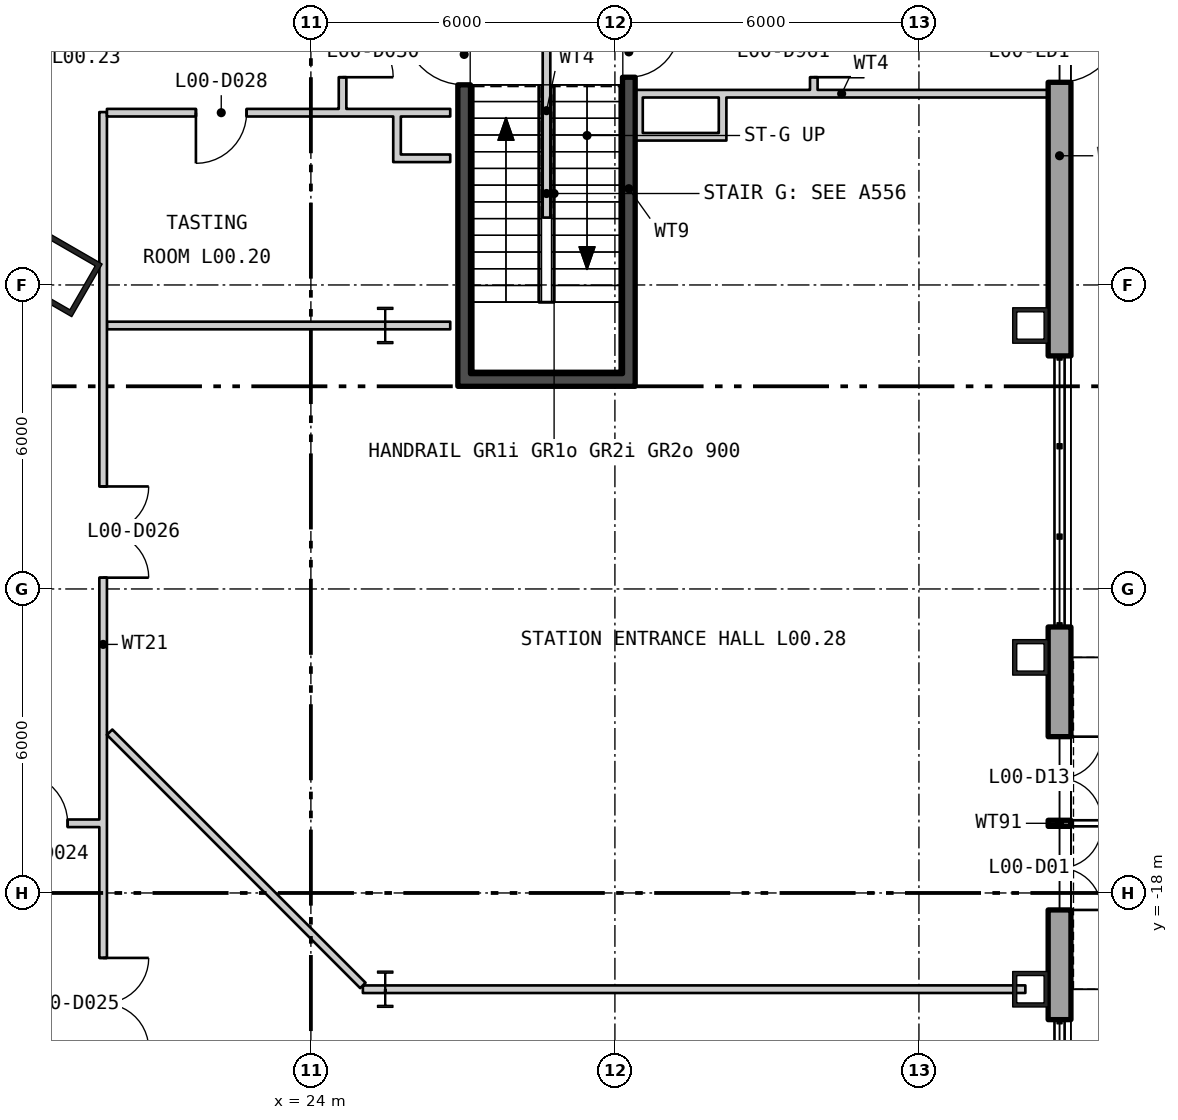
"""IFC4 building model, lengths in metres.
Left out: names, types, materials, properties, quantities, classifications, styles, units other than length and angle.
Written with IfcOpenShell. Run it as: python <this file> out.ifc"""

import sys

from ifc_helpers import new_model, si_unit, direction, frame, frame_2d, origin, origin_2d, place, context, subcontext, project, spatial, polyline, rectangle, hollow_rectangle, i_section, outline, extrude, element, fill, save


model = new_model("IFC4")
c1 = context("Model", 3, precision=1e-05, world=origin(), true_north=direction((0.0, 1.0)))
c2 = subcontext(c1, "Body", "Model", "MODEL_VIEW")
j1 = project(units=[si_unit("LENGTHUNIT", "METRE"), si_unit("PLANEANGLEUNIT", "RADIAN")], contexts=[c1])
p1 = place(None, origin())
s1 = spatial("IfcSite", under=j1, at=p1, CompositionType="ELEMENT")
p2 = place(p1, origin())
s2 = spatial("IfcBuilding", under=s1, at=p2, CompositionType="ELEMENT")
p3 = place(p2, origin())
s3 = spatial("IfcBuildingStorey", under=s2, at=p3, CompositionType="ELEMENT", Elevation=0.0)
p4 = place(p3, frame((19.061, -5.807, 0.0), z_axis=(0.0, 0.0, 1.0), x_axis=(0.5, 0.866025403784, 0.0)))
e1 = element("IfcColumn", 1, at=p4, inside=s3, PredefinedType="COLUMN", context=c2, shape_type="SweptSolid", body=[
    extrude(hollow_rectangle(XDim=1.2, YDim=1.2, WallThickness=0.1, at=origin_2d()), origin(), (0.0, 0.0, 1.0), 8.4),
])
for number, where, z_axis, x_axis in (
    (2, (38.2, -19.9, 0.0), (0.0, 0.0, 1.0), (0.0, 1.0, 0.0)),
    (3, (38.2, -13.35, 0.0), (0.0, 0.0, 1.0), (0.0, 1.0, 0.0)),
    (4, (38.2, -6.8, 0.0), (0.0, 0.0, 1.0), (0.0, 1.0, 0.0)),
):
    element("IfcColumn", number, at=place(p3, frame(where, z_axis=z_axis, x_axis=x_axis)), inside=s3, PredefinedType="COLUMN", context=c2, shape_type="SweptSolid", body=[
        extrude(hollow_rectangle(XDim=0.7, YDim=0.7, WallThickness=0.08, at=origin_2d()), origin(), (0.0, 0.0, 1.0), 8.4),
    ])
for number, where, z_axis, x_axis in (
    (5, (25.467, -6.8, 0.0), (0.0, 0.0, 1.0), (1.0, 0.0, 0.0)),
    (6, (25.467, -19.9, 0.0), (0.0, 0.0, 1.0), (1.0, 0.0, 0.0)),
):
    element("IfcColumn", number, at=place(p3, frame(where, z_axis=z_axis, x_axis=x_axis)), inside=s3, PredefinedType="COLUMN", context=c2, shape_type="SweptSolid", body=[
        extrude(i_section(OverallWidth=0.304, OverallDepth=0.716, WebThickness=0.021, FlangeThickness=0.04, at=origin_2d()), origin(), (0.0, 0.0, 1.0), 8.4),
    ])
p5 = place(p3, frame((38.775, -33.575, 5.4), z_axis=(0.0, 0.0, 1.0), x_axis=(0.0, 1.0, 0.0)))
e7 = element("IfcWall", 7, at=p5, inside=s3, PredefinedType="SOLIDWALL", context=c2, shape_type="SweptSolid", body=[
    extrude(outline(polyline([(-0.225, -0.225), (53.775, -0.225), (53.325, 0.225), (0.225, 0.225), (-0.225, -0.225)])), origin(), (0.0, 0.0, 1.0), 2.6),
])
for number, where, z_axis, x_axis in (
    (8, (38.775, -20.5, -0.4), (0.0, 0.0, 1.0), (0.0, 1.0, 0.0)),
    (9, (38.775, -13.95, -0.4), (0.0, 0.0, 1.0), (0.0, 1.0, 0.0)),
):
    element("IfcWall", number, at=place(p3, frame(where, z_axis=z_axis, x_axis=x_axis)), inside=s3, PredefinedType="SOLIDWALL", context=c2, shape_type="SweptSolid", body=[
        extrude(outline(polyline([(0.0, -0.225), (1.2, -0.225), (1.2, 0.225), (0.0, 0.225), (0.0, -0.225)])), origin(), (0.0, 0.0, 1.0), 5.51),
    ])
p6 = place(p3, frame((38.775, -7.4, -0.4), z_axis=(0.0, 0.0, 1.0), x_axis=(0.0, 1.0, 0.0)))
e10 = element("IfcWall", 10, at=p6, inside=s3, PredefinedType="SOLIDWALL", context=c2, shape_type="SweptSolid", body=[
    extrude(outline(polyline([(0.0, -0.225), (1.2, -0.225), (1.2, 0.225), (0.0, 0.225), (0.0, -0.225)])), origin(), (0.0, 0.0, 1.0), 5.8),
])
p7 = place(p3, frame((38.775, -25.85, -0.4), z_axis=(0.0, 0.0, 1.0), x_axis=(0.0, 1.0, 0.0)))
e11 = element("IfcWall", 11, at=p7, inside=s3, PredefinedType="SOLIDWALL", context=c2, shape_type="SweptSolid", body=[
    extrude(outline(polyline([(0.0, -0.225), (5.35, -0.225), (5.35, 0.225), (0.0, 0.225), (0.0, -0.225)])), origin(), (0.0, 0.0, 1.0), 1.0),
])
p8 = place(p3, frame((38.775, -19.3, -0.4), z_axis=(0.0, 0.0, 1.0), x_axis=(0.0, 1.0, 0.0)))
e12 = element("IfcWall", 12, at=p8, inside=s3, PredefinedType="SOLIDWALL", context=c2, shape_type="SweptSolid", body=[
    extrude(outline(polyline([(0.0, -0.225), (5.35, -0.225), (5.35, 0.225), (0.0, 0.225), (0.0, -0.225)])), origin(), (0.0, 0.0, 1.0), 5.8),
])
p9 = place(p8, frame((0.965, 0.0, 0.4)))
e13 = element("IfcOpeningElement", 13, at=p9, cuts=e12, PredefinedType="OPENING", context=c2, shape_type="SweptSolid", body=[
    extrude(rectangle(XDim=1.65, YDim=3.0, at=frame_2d((0.825, 1.5))), frame((0.0, 0.235, 0.0), z_axis=(0.0, -1.0, 0.0), x_axis=(1.0, 0.0, 0.0)), (0.0, 0.0, 1.0), 0.47),
])
p10 = place(p8, frame((2.735, 0.0, 0.4)))
e14 = element("IfcOpeningElement", 14, at=p10, cuts=e12, PredefinedType="OPENING", context=c2, shape_type="SweptSolid", body=[
    extrude(rectangle(XDim=1.65, YDim=3.0, at=frame_2d((0.825, 1.5))), frame((0.0, 0.235, 0.0), z_axis=(0.0, -1.0, 0.0), x_axis=(1.0, 0.0, 0.0)), (0.0, 0.0, 1.0), 0.47),
])
p11 = place(p3, frame((38.775, -12.75, -0.4), z_axis=(0.0, 0.0, 1.0), x_axis=(0.0, 1.0, 0.0)))
e15 = element("IfcWall", 15, at=p11, inside=s3, PredefinedType="SOLIDWALL", context=c2, shape_type="SweptSolid", body=[
    extrude(outline(polyline([(0.0, -0.225), (5.35, -0.225), (5.35, 0.225), (0.0, 0.225), (0.0, -0.225)])), origin(), (0.0, 0.0, 1.0), 1.0),
])
p12 = place(p3, frame((38.775, -6.2, -0.4), z_axis=(0.0, 0.0, 1.0), x_axis=(0.0, 1.0, 0.0)))
e16 = element("IfcWall", 16, at=p12, inside=s3, PredefinedType="SOLIDWALL", context=c2, shape_type="SweptSolid", body=[
    extrude(outline(polyline([(0.0, -0.225), (5.5, -0.225), (5.5, 0.225), (0.0, 0.225), (0.0, -0.225)])), origin(), (0.0, 0.0, 1.0), 5.8),
])
p13 = place(p12, frame((4.2, 0.0, 0.4)))
e17 = element("IfcOpeningElement", 17, at=p13, cuts=e16, PredefinedType="OPENING", context=c2, shape_type="SweptSolid", body=[
    extrude(rectangle(XDim=1.2, YDim=2.4, at=frame_2d((0.6, 1.2))), frame((0.0, 0.235, 0.0), z_axis=(0.0, -1.0, 0.0), x_axis=(1.0, 0.0, 0.0)), (0.0, 0.0, 1.0), 0.47),
])
p14 = place(p3, frame((27.025, -7.75, 0.0), z_axis=(0.0, 0.0, 1.0), x_axis=(0.0, 1.0, 0.0)))
e18 = element("IfcWall", 18, at=p14, inside=s3, PredefinedType="SHEAR", context=c2, shape_type="SweptSolid", body=[
    extrude(rectangle(XDim=7.3, YDim=0.25, at=frame_2d((3.65, 0.0))), origin(), (0.0, 0.0, 1.0), 8.18),
])
p15 = place(p14, frame((5.7, 0.0, 0.0)))
e19 = element("IfcOpeningElement", 19, at=p15, cuts=e18, PredefinedType="OPENING", context=c2, shape_type="SweptSolid", body=[
    extrude(rectangle(XDim=1.2, YDim=2.1, at=frame_2d((0.6, 1.05))), frame((0.0, 0.135, 0.0), z_axis=(0.0, -1.0, 0.0), x_axis=(1.0, 0.0, 0.0)), (0.0, 0.0, 1.0), 0.27),
])
p16 = place(p3, frame((30.275, -7.75, 0.0), z_axis=(0.0, 0.0, 1.0), x_axis=(0.0, 1.0, 0.0)))
e20 = element("IfcWall", 20, at=p16, inside=s3, PredefinedType="SHEAR", context=c2, shape_type="SweptSolid", body=[
    extrude(rectangle(XDim=7.3, YDim=0.25, at=frame_2d((3.65, 0.0))), origin(), (0.0, 0.0, 1.0), 8.18),
])
p17 = place(p16, frame((5.85, 0.0, 0.0)))
e21 = element("IfcOpeningElement", 21, at=p17, cuts=e20, PredefinedType="OPENING", context=c2, shape_type="SweptSolid", body=[
    extrude(rectangle(XDim=1.0, YDim=2.1, at=frame_2d((0.5, 1.05))), frame((0.0, 0.135, 0.0), z_axis=(0.0, -1.0, 0.0), x_axis=(1.0, 0.0, 0.0)), (0.0, 0.0, 1.0), 0.27),
])
p18 = place(p3, frame((26.9, -7.875, 0.0), z_axis=(0.0, 0.0, 1.0), x_axis=(1.0, 0.0, 0.0)))
e22 = element("IfcWall", 22, at=p18, inside=s3, PredefinedType="SHEAR", context=c2, shape_type="SweptSolid", body=[
    extrude(rectangle(XDim=3.5, YDim=0.25, at=frame_2d((1.75, 0.0))), origin(), (0.0, 0.0, 1.0), 8.18),
])
p19 = place(p3, frame((28.65, -4.67, 0.0), z_axis=(0.0, 0.0, 1.0), x_axis=(0.0, 1.0, 0.0)))
e23 = element("IfcWall", 23, at=p19, inside=s3, PredefinedType="PARTITIONING", context=c2, shape_type="SweptSolid", body=[
    extrude(rectangle(XDim=4.22, YDim=0.15, at=frame_2d((2.11, 0.0))), origin(), (0.0, 0.0, 1.0), 4.0),
])
p20 = place(p3, frame((38.55, -2.225, 0.0), z_axis=(0.0, 0.0, 1.0), x_axis=(-1.0, 0.0, 0.0)))
e24 = element("IfcWall", 24, at=p20, inside=s3, PredefinedType="PARTITIONING", context=c2, shape_type="SweptSolid", body=[
    extrude(rectangle(XDim=8.15, YDim=0.15, at=frame_2d((4.075, 0.0))), origin(), (0.0, 0.0, 1.0), 8.18),
])
p21 = place(p3, frame((33.925, -2.15, 0.0), z_axis=(0.0, 0.0, 1.0), x_axis=(0.0, 1.0, 0.0)))
e25 = element("IfcWall", 25, at=p21, inside=s3, PredefinedType="PARTITIONING", context=c2, shape_type="SweptSolid", body=[
    extrude(rectangle(XDim=1.5, YDim=0.15, at=frame_2d((0.75, 0.0))), origin(), (0.0, 0.0, 1.0), 8.18),
])
p22 = place(p21, frame((0.25, 0.0, 0.0)))
e26 = element("IfcOpeningElement", 26, at=p22, cuts=e25, PredefinedType="OPENING", context=c2, shape_type="SweptSolid", body=[
    extrude(rectangle(XDim=1.0, YDim=2.1, at=frame_2d((0.5, 1.05))), frame((0.0, 0.085, 0.0), z_axis=(0.0, -1.0, 0.0), x_axis=(1.0, 0.0, 0.0)), (0.0, 0.0, 1.0), 0.17),
])
p23 = place(p3, frame((30.4, -3.075, 0.0), z_axis=(0.0, 0.0, 1.0), x_axis=(1.0, 0.0, 0.0)))
e27 = element("IfcWall", 27, at=p23, inside=s3, PredefinedType="PARTITIONING", context=c2, shape_type="SweptSolid", body=[
    extrude(rectangle(XDim=1.8, YDim=0.15, at=frame_2d((0.9, 0.0))), origin(), (0.0, 0.0, 1.0), 8.18),
])
for number, where, z_axis, x_axis in (
    (28, (30.475, -3.0, 0.0), (0.0, 0.0, 1.0), (0.0, 1.0, 0.0)),
    (29, (32.125, -3.0, 0.0), (0.0, 0.0, 1.0), (0.0, 1.0, 0.0)),
):
    element("IfcWall", number, at=place(p3, frame(where, z_axis=z_axis, x_axis=x_axis)), inside=s3, PredefinedType="PARTITIONING", context=c2, shape_type="SweptSolid", body=[
        extrude(rectangle(XDim=0.7, YDim=0.15, at=frame_2d((0.35, 0.0))), origin(), (0.0, 0.0, 1.0), 8.18),
    ])
p24 = place(p3, frame((17.575, -16.625, 0.0), z_axis=(0.0, 0.0, 1.0), x_axis=(1.0, 0.0, 0.0)))
e30 = element("IfcWall", 30, at=p24, inside=s3, PredefinedType="PARTITIONING", context=c2, shape_type="SweptSolid", body=[
    extrude(rectangle(XDim=2.25, YDim=0.15, at=frame_2d((1.125, 0.0))), origin(), (0.0, 0.0, 1.0), 8.18),
])
p25 = place(p24, frame((0.625, 0.0, 0.0)))
e31 = element("IfcOpeningElement", 31, at=p25, cuts=e30, PredefinedType="OPENING", context=c2, shape_type="SweptSolid", body=[
    extrude(rectangle(XDim=1.0, YDim=2.1, at=frame_2d((0.5, 1.05))), frame((0.0, 0.085, 0.0), z_axis=(0.0, -1.0, 0.0), x_axis=(1.0, 0.0, 0.0)), (0.0, 0.0, 1.0), 0.17),
])
p26 = place(p3, frame((19.9, -23.6, 0.0), z_axis=(0.0, 0.0, 1.0), x_axis=(0.0, 1.0, 0.0)))
e32 = element("IfcWall", 32, at=p26, inside=s3, PredefinedType="PARTITIONING", context=c2, shape_type="SweptSolid", body=[
    extrude(rectangle(XDim=21.012, YDim=0.15, at=frame_2d((10.506, 0.0))), origin(), (0.0, 0.0, 1.0), 8.18),
])
p27 = place(p26, frame((2.518, 0.0, 0.0)))
e33 = element("IfcOpeningElement", 33, at=p27, cuts=e32, PredefinedType="OPENING", context=c2, shape_type="SweptSolid", body=[
    extrude(rectangle(XDim=1.8, YDim=2.1, at=frame_2d((0.9, 1.05))), frame((0.0, 0.085, 0.0), z_axis=(0.0, -1.0, 0.0), x_axis=(1.0, 0.0, 0.0)), (0.0, 0.0, 1.0), 0.17),
])
p28 = place(p26, frame((11.823, 0.0, 0.0)))
e34 = element("IfcOpeningElement", 34, at=p28, cuts=e32, PredefinedType="OPENING", context=c2, shape_type="SweptSolid", body=[
    extrude(rectangle(XDim=1.8, YDim=2.1, at=frame_2d((0.9, 1.05))), frame((0.0, 0.085, 0.0), z_axis=(0.0, -1.0, 0.0), x_axis=(1.0, 0.0, 0.0)), (0.0, 0.0, 1.0), 0.17),
])
p29 = place(p3, frame((19.975, -6.8, 0.0), z_axis=(0.0, 0.0, 1.0), x_axis=(1.0, 0.0, 0.0)))
e35 = element("IfcWall", 35, at=p29, inside=s3, PredefinedType="PARTITIONING", context=c2, shape_type="SweptSolid", body=[
    extrude(rectangle(XDim=6.775, YDim=0.15, at=frame_2d((3.388, 0.0))), origin(), (0.0, 0.0, 1.0), 7.39),
])
p30 = place(p3, frame((19.975, -2.6, 0.0), z_axis=(0.0, 0.0, 1.0), x_axis=(1.0, 0.0, 0.0)))
e36 = element("IfcWall", 36, at=p30, inside=s3, PredefinedType="PARTITIONING", context=c2, shape_type="SweptSolid", body=[
    extrude(rectangle(XDim=5.713, YDim=0.15, at=frame_2d((2.857, 0.0))), origin(), (0.0, 0.0, 1.0), 8.18),
])
p31 = place(p30, frame((1.756, 0.0, 0.0)))
e37 = element("IfcOpeningElement", 37, at=p31, cuts=e36, PredefinedType="OPENING", context=c2, shape_type="SweptSolid", body=[
    extrude(rectangle(XDim=1.0, YDim=2.1, at=frame_2d((0.5, 1.05))), frame((0.0, 0.085, 0.0), z_axis=(0.0, -1.0, 0.0), x_axis=(1.0, 0.0, 0.0)), (0.0, 0.0, 1.0), 0.17),
])
p32 = place(p3, frame((20.028, -14.827, 0.0), z_axis=(0.0, 0.0, 1.0), x_axis=(0.707106781187, -0.707106781187, 0.0)))
e38 = element("IfcWall", 38, at=p32, inside=s3, PredefinedType="PARTITIONING", context=c2, shape_type="SweptSolid", body=[
    extrude(rectangle(XDim=7.068, YDim=0.15, at=frame_2d((3.534, 0.0))), origin(), (0.0, 0.0, 1.0), 8.18),
])
p33 = place(p3, frame((24.625, -2.525, 0.0), z_axis=(0.0, 0.0, 1.0), x_axis=(0.0, 1.0, 0.0)))
e39 = element("IfcWall", 39, at=p33, inside=s3, PredefinedType="PARTITIONING", context=c2, shape_type="SweptSolid", body=[
    extrude(rectangle(XDim=2.25, YDim=0.15, at=frame_2d((1.125, 0.0))), origin(), (0.0, 0.0, 1.0), 8.18),
])
p34 = place(p33, frame((0.625, 0.0, 0.0)))
e40 = element("IfcOpeningElement", 40, at=p34, cuts=e39, PredefinedType="OPENING", context=c2, shape_type="SweptSolid", body=[
    extrude(rectangle(XDim=1.0, YDim=2.1, at=frame_2d((0.5, 1.05))), frame((0.0, 0.085, 0.0), z_axis=(0.0, -1.0, 0.0), x_axis=(1.0, 0.0, 0.0)), (0.0, 0.0, 1.0), 0.17),
])
p35 = place(p3, frame((25.026, -19.9, 0.0), z_axis=(0.0, 0.0, 1.0), x_axis=(1.0, 0.0, 0.0)))
e41 = element("IfcWall", 41, at=p35, inside=s3, PredefinedType="PARTITIONING", context=c2, shape_type="SweptSolid", body=[
    extrude(rectangle(XDim=0.441, YDim=0.15, at=frame_2d((0.221, 0.0))), origin(), (0.0, 0.0, 1.0), 8.18),
])
p36 = place(p3, frame((25.467, -19.9, 0.0), z_axis=(0.0, 0.0, 1.0), x_axis=(0.999999996867, 7.9157761e-05, 0.0)))
e42 = element("IfcWall", 42, at=p36, inside=s3, PredefinedType="PARTITIONING", context=c2, shape_type="SweptSolid", body=[
    extrude(rectangle(XDim=12.633, YDim=0.15, at=frame_2d((6.316, 0.0))), origin(), (0.0, 0.0, 1.0), 7.39),
])
p37 = place(p3, frame((25.625, -3.5, 0.0), z_axis=(0.0, 0.0, 1.0), x_axis=(1.0, 0.0, 0.0)))
e43 = element("IfcWall", 43, at=p37, inside=s3, PredefinedType="PARTITIONING", context=c2, shape_type="SweptSolid", body=[
    extrude(rectangle(XDim=1.125, YDim=0.15, at=frame_2d((0.562, 0.0))), origin(), (0.0, 0.0, 1.0), 8.18),
])
p38 = place(p3, frame((25.688, -2.6, 0.0), z_axis=(0.0, 0.0, 1.0), x_axis=(1.0, 0.0, 0.0)))
e44 = element("IfcWall", 44, at=p38, inside=s3, PredefinedType="PARTITIONING", context=c2, shape_type="SweptSolid", body=[
    extrude(rectangle(XDim=1.062, YDim=0.15, at=frame_2d((0.531, 0.0))), origin(), (0.0, 0.0, 1.0), 8.18),
])
p39 = place(p3, frame((25.7, -3.425, 0.0), z_axis=(0.0, 0.0, 1.0), x_axis=(0.0, 1.0, 0.0)))
e45 = element("IfcWall", 45, at=p39, inside=s3, PredefinedType="PARTITIONING", context=c2, shape_type="SweptSolid", body=[
    extrude(rectangle(XDim=0.75, YDim=0.15, at=frame_2d((0.375, 0.0))), origin(), (0.0, 0.0, 1.0), 8.18),
])
p40 = place(p9, frame((1.65, 0.0, 0.0), z_axis=(0.0, 0.0, 1.0), x_axis=(-1.0, 0.0, 0.0)))
e46 = element("IfcDoor", 46, at=p40, inside=s3, OperationType="DOUBLE_DOOR_DOUBLE_SWING", PredefinedType="DOOR", context=c2, shape_type="SweptSolid", body=[
    extrude(rectangle(XDim=1.65, YDim=3.0, at=frame_2d((0.825, 1.5))), frame((0.0, 0.025, 0.0), z_axis=(0.0, -1.0, 0.0), x_axis=(1.0, 0.0, 0.0)), (0.0, 0.0, 1.0), 0.05),
])
fill(e13, e46)
p41 = place(p10, frame((1.65, 0.0, 0.0), z_axis=(0.0, 0.0, 1.0), x_axis=(-1.0, 0.0, 0.0)))
e47 = element("IfcDoor", 47, at=p41, inside=s3, OperationType="DOUBLE_DOOR_DOUBLE_SWING", PredefinedType="DOOR", context=c2, shape_type="SweptSolid", body=[
    extrude(rectangle(XDim=1.65, YDim=3.0, at=frame_2d((0.825, 1.5))), frame((0.0, 0.025, 0.0), z_axis=(0.0, -1.0, 0.0), x_axis=(1.0, 0.0, 0.0)), (0.0, 0.0, 1.0), 0.05),
])
fill(e14, e47)
p42 = place(p13, frame((1.2, 0.0, 0.0), z_axis=(0.0, 0.0, 1.0), x_axis=(-1.0, 0.0, 0.0)))
e48 = element("IfcDoor", 48, at=p42, inside=s3, OperationType="SINGLE_SWING_RIGHT", PredefinedType="DOOR", context=c2, shape_type="SweptSolid", body=[
    extrude(rectangle(XDim=1.2, YDim=2.4, at=frame_2d((0.6, 1.2))), frame((0.0, 0.025, 0.0), z_axis=(0.0, -1.0, 0.0), x_axis=(1.0, 0.0, 0.0)), (0.0, 0.0, 1.0), 0.05),
])
fill(e17, e48)
p43 = place(p15, origin())
e49 = element("IfcDoor", 49, at=p43, inside=s3, OperationType="SINGLE_SWING_LEFT", PredefinedType="DOOR", context=c2, shape_type="SweptSolid", body=[
    extrude(rectangle(XDim=1.2, YDim=2.1, at=frame_2d((0.6, 1.05))), frame((0.0, 0.025, 0.0), z_axis=(0.0, -1.0, 0.0), x_axis=(1.0, 0.0, 0.0)), (0.0, 0.0, 1.0), 0.05),
])
fill(e19, e49)
p44 = place(p17, origin())
e50 = element("IfcDoor", 50, at=p44, inside=s3, OperationType="SINGLE_SWING_RIGHT", PredefinedType="DOOR", context=c2, shape_type="SweptSolid", body=[
    extrude(rectangle(XDim=1.0, YDim=2.1, at=frame_2d((0.5, 1.05))), frame((0.0, 0.025, 0.0), z_axis=(0.0, -1.0, 0.0), x_axis=(1.0, 0.0, 0.0)), (0.0, 0.0, 1.0), 0.05),
])
fill(e21, e50)
p45 = place(p22, origin())
e51 = element("IfcDoor", 51, at=p45, inside=s3, OperationType="SINGLE_SWING_LEFT", PredefinedType="DOOR", context=c2, shape_type="SweptSolid", body=[
    extrude(rectangle(XDim=1.0, YDim=2.1, at=frame_2d((0.5, 1.05))), frame((0.0, 0.025, 0.0), z_axis=(0.0, -1.0, 0.0), x_axis=(1.0, 0.0, 0.0)), (0.0, 0.0, 1.0), 0.05),
])
fill(e26, e51)
p46 = place(p25, origin())
e52 = element("IfcDoor", 52, at=p46, inside=s3, OperationType="SINGLE_SWING_RIGHT", PredefinedType="DOOR", context=c2, shape_type="SweptSolid", body=[
    extrude(rectangle(XDim=1.0, YDim=2.1, at=frame_2d((0.5, 1.05))), frame((0.0, 0.025, 0.0), z_axis=(0.0, -1.0, 0.0), x_axis=(1.0, 0.0, 0.0)), (0.0, 0.0, 1.0), 0.05),
])
fill(e31, e52)
p47 = place(p27, origin())
e53 = element("IfcDoor", 53, at=p47, inside=s3, OperationType="DOUBLE_DOOR_SINGLE_SWING", PredefinedType="DOOR", context=c2, shape_type="SweptSolid", body=[
    extrude(rectangle(XDim=1.8, YDim=2.1, at=frame_2d((0.9, 1.05))), frame((0.0, 0.025, 0.0), z_axis=(0.0, -1.0, 0.0), x_axis=(1.0, 0.0, 0.0)), (0.0, 0.0, 1.0), 0.05),
])
fill(e33, e53)
p48 = place(p28, origin())
e54 = element("IfcDoor", 54, at=p48, inside=s3, OperationType="DOUBLE_DOOR_SINGLE_SWING", PredefinedType="DOOR", context=c2, shape_type="SweptSolid", body=[
    extrude(rectangle(XDim=1.8, YDim=2.1, at=frame_2d((0.9, 1.05))), frame((0.0, 0.025, 0.0), z_axis=(0.0, -1.0, 0.0), x_axis=(1.0, 0.0, 0.0)), (0.0, 0.0, 1.0), 0.05),
])
fill(e34, e54)
p49 = place(p31, origin())
e55 = element("IfcDoor", 55, at=p49, inside=s3, OperationType="SINGLE_SWING_LEFT", PredefinedType="DOOR", context=c2, shape_type="SweptSolid", body=[
    extrude(rectangle(XDim=1.0, YDim=2.1, at=frame_2d((0.5, 1.05))), frame((0.0, 0.025, 0.0), z_axis=(0.0, -1.0, 0.0), x_axis=(1.0, 0.0, 0.0)), (0.0, 0.0, 1.0), 0.05),
])
fill(e37, e55)
p50 = place(p34, origin())
e56 = element("IfcDoor", 56, at=p50, inside=s3, OperationType="SINGLE_SWING_LEFT", PredefinedType="DOOR", context=c2, shape_type="SweptSolid", body=[
    extrude(rectangle(XDim=1.0, YDim=2.1, at=frame_2d((0.5, 1.05))), frame((0.0, 0.025, 0.0), z_axis=(0.0, -1.0, 0.0), x_axis=(1.0, 0.0, 0.0)), (0.0, 0.0, 1.0), 0.05),
])
fill(e40, e56)
save(model, sys.argv[1])
